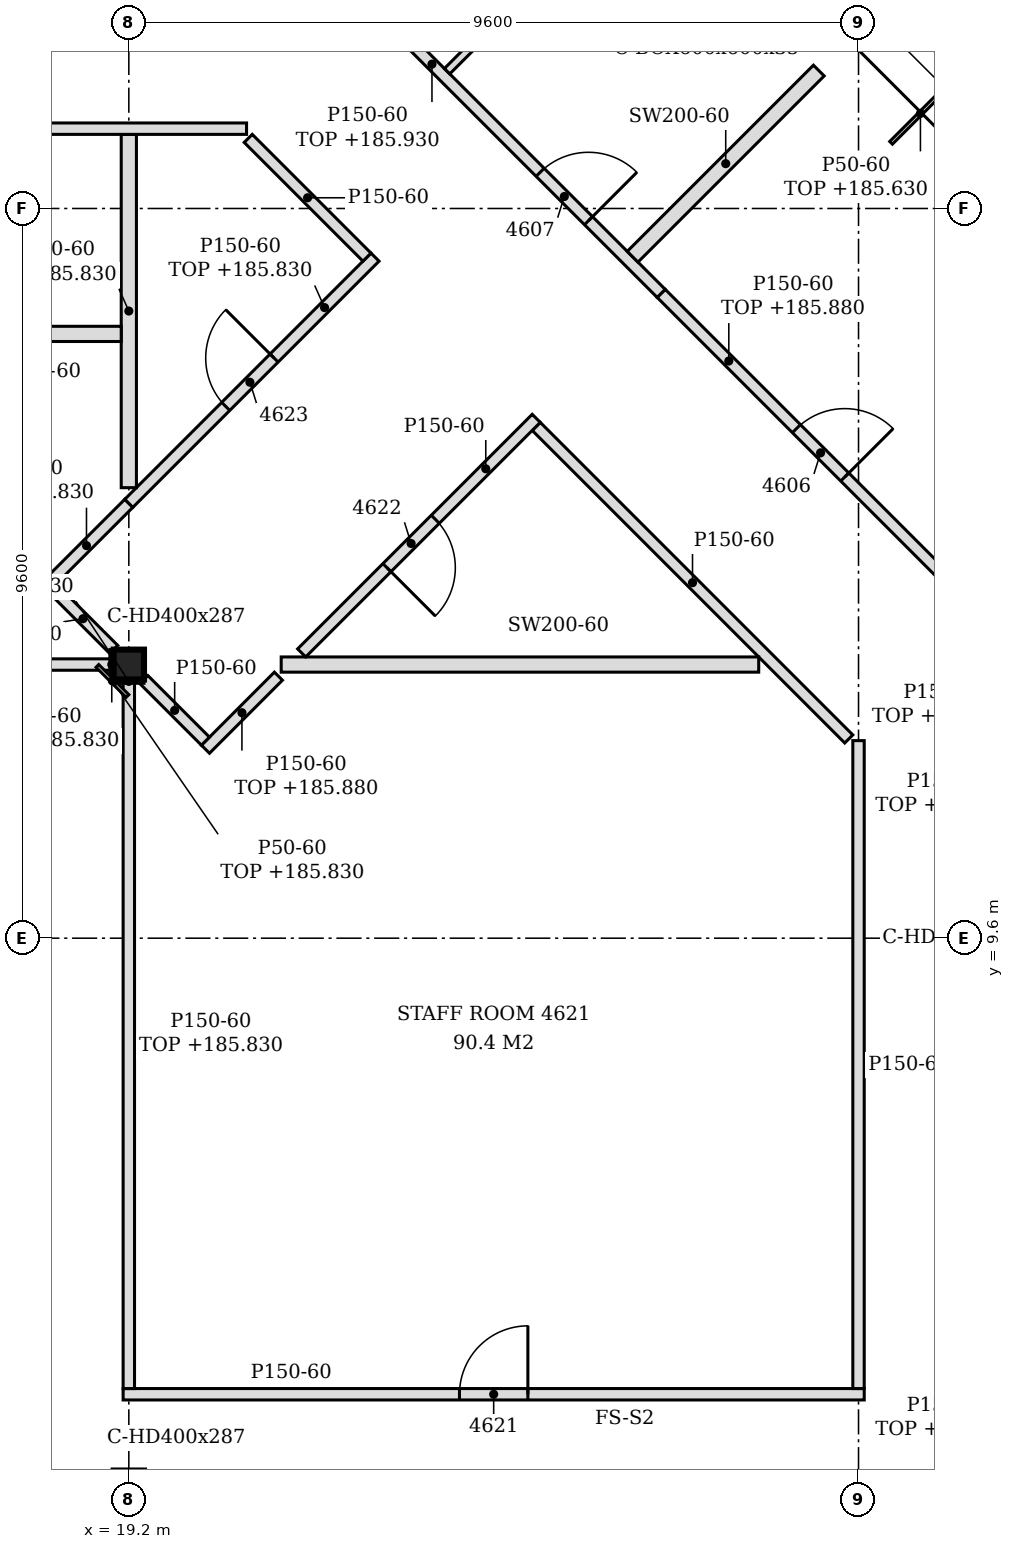
"""IFC4 building model, lengths in metres.
Left out: names, types, materials, properties, quantities, classifications, styles, units other than length and angle.
Written with IfcOpenShell. Run it as: python <this file> out.ifc"""

import sys

from ifc_helpers import new_model, si_unit, direction, frame, frame_2d, origin, origin_2d, place, context, subcontext, project, spatial, polyline, rectangle, hollow_rectangle, i_section, outline, extrude, clip, halfspace, element, fill, save


model = new_model("IFC4")
c1 = context("Model", 3, precision=1e-05, world=origin(), true_north=direction((0.0, 1.0)))
c2 = subcontext(c1, "Body", "Model", "MODEL_VIEW")
j1 = project(units=[si_unit("LENGTHUNIT", "METRE"), si_unit("PLANEANGLEUNIT", "RADIAN")], contexts=[c1])
p1 = place(None, origin())
s1 = spatial("IfcSite", under=j1, at=p1, CompositionType="ELEMENT")
p2 = place(p1, origin())
s2 = spatial("IfcBuilding", under=s1, at=p2, CompositionType="ELEMENT")
p3 = place(p2, frame((0.0, 0.0, 183.0)))
s3 = spatial("IfcBuildingStorey", under=s2, at=p3, CompositionType="ELEMENT", Elevation=183.0)
p4 = place(p3, frame((27.876, 21.926, -0.15), z_axis=(0.387233423141, -0.258175624389, 0.885096391911), x_axis=(0.554729959787, 0.832030451194, 0.0)))
e1 = element("IfcColumn", 1, at=p4, inside=s3, PredefinedType="COLUMN", context=c2, shape_type="Clipping", body=[
    clip(extrude(hollow_rectangle(XDim=0.6, YDim=0.6, WallThickness=0.035, at=origin_2d()), origin(), (0.0, 0.0, 1.0), 4.067), halfspace(frame((0.0, 0.0, 0.019), z_axis=(0.0, 0.0, 1.0), x_axis=(1.0, 0.0, 0.0)), True)),
])
p5 = place(p3, frame((19.2, 13.2, -0.15), z_axis=(0.0, 0.0, 1.0), x_axis=(1.0, 0.0, 0.0)))
e2 = element("IfcColumn", 2, at=p5, inside=s3, PredefinedType="COLUMN", context=c2, shape_type="SweptSolid", body=[
    extrude(i_section(OverallWidth=0.399, OverallDepth=0.393, WebThickness=0.023, FlangeThickness=0.037, FilletRadius=0.015, at=origin_2d()), origin(), (0.0, 0.0, 1.0), 3.6),
])
p6 = place(p3, frame((19.125, 3.6, 0.0), z_axis=(0.0, 0.0, 1.0), x_axis=(1.0, 0.0, 0.0)))
e3 = element("IfcWall", 3, at=p6, inside=s3, PredefinedType="PARTITIONING", context=c2, shape_type="SweptSolid", body=[
    extrude(outline(polyline([(0.0, 0.0), (9.75, 0.0), (9.75, 3.45), (0.225, 3.45), (0.223, 2.83), (0.0, 2.83), (0.0, 0.0)])), frame((0.0, 0.075, 0.0), z_axis=(0.0, -1.0, 0.0), x_axis=(1.0, 0.0, 0.0)), (0.0, 0.0, 1.0), 0.15),
])
p7 = place(p6, frame((4.425, 0.0, 0.0)))
e4 = element("IfcOpeningElement", 4, at=p7, cuts=e3, PredefinedType="OPENING", context=c2, shape_type="SweptSolid", body=[
    extrude(rectangle(XDim=0.9, YDim=2.1, at=frame_2d((0.45, 1.05))), frame((0.0, 0.085, 0.0), z_axis=(0.0, -1.0, 0.0), x_axis=(1.0, 0.0, 0.0)), (0.0, 0.0, 1.0), 0.17),
])
p8 = place(p3, frame((19.2, 3.675, 0.0), z_axis=(0.0, 0.0, 1.0), x_axis=(0.0, 1.0, 0.0)))
e5 = element("IfcWall", 5, at=p8, inside=s3, PredefinedType="PARTITIONING", context=c2, shape_type="SweptSolid", body=[
    extrude(rectangle(XDim=9.328, YDim=0.15, at=frame_2d((4.664, 0.0))), origin(), (0.0, 0.0, 1.0), 2.83),
])
p9 = place(p3, frame((28.8, 3.675, 0.0), z_axis=(0.0, 0.0, 1.0), x_axis=(0.0, 1.0, 0.0)))
e6 = element("IfcWall", 6, at=p9, inside=s3, PredefinedType="PARTITIONING", context=c2, shape_type="SweptSolid", body=[
    extrude(outline(polyline([(0.0, 0.0), (8.524, 0.0), (8.524, 3.45), (8.43, 3.45), (8.428, 2.88), (8.22, 2.88), (8.218, 3.45), (3.63, 3.45), (3.628, 2.88), (3.42, 2.88), (3.418, 3.45), (0.0, 3.45), (0.0, 0.0)])), frame((0.0, 0.075, 0.0), z_axis=(0.0, -1.0, 0.0), x_axis=(1.0, 0.0, 0.0)), (0.0, 0.0, 1.0), 0.15),
])
p10 = place(p3, frame((20.208, 12.086, 0.0), z_axis=(0.0, 0.0, 1.0), x_axis=(0.706747296365, 0.707466083343, 0.0)))
e7 = element("IfcWall", 7, at=p10, inside=s3, PredefinedType="PARTITIONING", context=c2, shape_type="SweptSolid", body=[
    extrude(rectangle(XDim=1.359, YDim=0.15, at=frame_2d((0.679, 0.0))), origin(), (0.0, 0.0, 1.0), 2.88),
])
p11 = place(p3, frame((20.208, 12.192, 0.0), z_axis=(0.0, 0.0, 1.0), x_axis=(-0.70721334539, 0.707000200921, 0.0)))
e8 = element("IfcWall", 8, at=p11, inside=s3, PredefinedType="PARTITIONING", context=c2, shape_type="SweptSolid", body=[
    extrude(rectangle(XDim=1.146, YDim=0.15, at=frame_2d((0.573, 0.0))), origin(), (0.0, 0.0, 1.0), 3.45),
])
p12 = place(p3, frame((28.672, 12.221, 0.0), z_axis=(0.0, 0.0, 1.0), x_axis=(-0.707106781187, 0.707106781187, 0.0)))
e9 = element("IfcWall", 9, at=p12, inside=s3, PredefinedType="PARTITIONING", context=c2, shape_type="SweptSolid", body=[
    extrude(rectangle(XDim=5.815, YDim=0.15, at=frame_2d((2.908, 0.0))), origin(), (0.0, 0.0, 1.0), 3.45),
])
p13 = place(p3, frame((7.399, 13.2, 0.0), z_axis=(0.0, 0.0, 1.0), x_axis=(1.0, 0.0, 0.0)))
e10 = element("IfcWall", 10, at=p13, inside=s3, PredefinedType="PARTITIONING", context=c2, shape_type="SweptSolid", body=[
    extrude(rectangle(XDim=11.601, YDim=0.15, at=frame_2d((5.801, 0.0))), origin(), (0.0, 0.0, 1.0), 2.83),
])
p14 = place(p13, frame((0.551, 0.0, 0.0)))
e11 = element("IfcOpeningElement", 11, at=p14, cuts=e10, PredefinedType="OPENING", context=c2, shape_type="SweptSolid", body=[
    extrude(rectangle(XDim=0.9, YDim=2.1, at=frame_2d((0.45, 1.05))), frame((0.0, 0.085, 0.0), z_axis=(0.0, -1.0, 0.0), x_axis=(1.0, 0.0, 0.0)), (0.0, 0.0, 1.0), 0.17),
])
p15 = place(p3, frame((21.205, 13.2, 0.0), z_axis=(0.0, 0.0, 1.0), x_axis=(1.0, 0.0, 0.0)))
e12 = element("IfcWall", 12, at=p15, inside=s3, PredefinedType="PARTITIONING", context=c2, shape_type="SweptSolid", body=[
    extrude(rectangle(XDim=6.282, YDim=0.2, at=frame_2d((3.141, 0.0))), origin(), (0.0, 0.0, 1.0), 3.45),
])
p16 = place(p3, frame((19.002, 13.398, 0.0), z_axis=(0.0, 0.0, 1.0), x_axis=(-0.707000200921, 0.70721334539, 0.0)))
e13 = element("IfcWall", 13, at=p16, inside=s3, PredefinedType="PARTITIONING", context=c2, shape_type="SweptSolid", body=[
    extrude(rectangle(XDim=1.146, YDim=0.15, at=frame_2d((0.573, 0.0))), origin(), (0.0, 0.0, 1.0), 3.45),
])
p17 = place(p3, frame((21.474, 13.353, 0.0), z_axis=(0.0, 0.0, 1.0), x_axis=(0.707078810744, 0.707134750523, 0.0)))
e14 = element("IfcWall", 14, at=p17, inside=s3, PredefinedType="PARTITIONING", context=c2, shape_type="SweptSolid", body=[
    extrude(rectangle(XDim=4.364, YDim=0.15, at=frame_2d((2.182, 0.0))), origin(), (0.0, 0.0, 1.0), 3.45),
])
p18 = place(p17, frame((1.586, 0.0, 0.0)))
e15 = element("IfcOpeningElement", 15, at=p18, cuts=e14, PredefinedType="OPENING", context=c2, shape_type="SweptSolid", body=[
    extrude(rectangle(XDim=0.9, YDim=2.1, at=frame_2d((0.45, 1.05))), frame((0.0, 0.085, 0.0), z_axis=(0.0, -1.0, 0.0), x_axis=(1.0, 0.0, 0.0)), (0.0, 0.0, 1.0), 0.17),
])
p19 = place(p3, frame((30.328, 13.958, 0.0), z_axis=(0.0, 0.0, 1.0), x_axis=(-0.707023070192, 0.707190482272, 0.0)))
e16 = element("IfcWall", 16, at=p19, inside=s3, PredefinedType="PARTITIONING", context=c2, shape_type="SweptSolid", body=[
    extrude(rectangle(XDim=5.833, YDim=0.15, at=frame_2d((2.917, 0.0))), origin(), (0.0, 0.0, 1.0), 2.88),
])
p20 = place(p19, frame((2.417, 0.0, 0.0)))
e17 = element("IfcOpeningElement", 17, at=p20, cuts=e16, PredefinedType="OPENING", context=c2, shape_type="SweptSolid", body=[
    extrude(rectangle(XDim=0.9, YDim=2.1, at=frame_2d((0.45, 1.05))), frame((0.0, 0.085, 0.0), z_axis=(0.0, -1.0, 0.0), x_axis=(1.0, 0.0, 0.0)), (0.0, 0.0, 1.0), 0.17),
])
p21 = place(p3, frame((18.086, 14.208, 0.0), z_axis=(0.0, 0.0, 1.0), x_axis=(0.707416779731, 0.706796646678, 0.0)))
e18 = element("IfcWall", 18, at=p21, inside=s3, PredefinedType="PARTITIONING", context=c2, shape_type="SweptSolid", body=[
    extrude(rectangle(XDim=1.575, YDim=0.15, at=frame_2d((0.787, 0.0))), origin(), (0.0, 0.0, 1.0), 2.83),
])
p22 = place(p3, frame((19.2, 15.321, 0.0), z_axis=(0.0, 0.0, 1.0), x_axis=(0.707106781187, 0.707106781187, 0.0)))
e19 = element("IfcWall", 19, at=p22, inside=s3, PredefinedType="PARTITIONING", context=c2, shape_type="SweptSolid", body=[
    extrude(rectangle(XDim=4.581, YDim=0.15, at=frame_2d((2.29, 0.0))), origin(), (0.0, 0.0, 1.0), 2.83),
])
p23 = place(p22, frame((1.803, 0.0, 0.0)))
e20 = element("IfcOpeningElement", 20, at=p23, cuts=e19, PredefinedType="OPENING", context=c2, shape_type="SweptSolid", body=[
    extrude(rectangle(XDim=0.9, YDim=2.1, at=frame_2d((0.45, 1.05))), frame((0.0, 0.085, 0.0), z_axis=(0.0, -1.0, 0.0), x_axis=(1.0, 0.0, 0.0)), (0.0, 0.0, 1.0), 0.17),
])
p24 = place(p3, frame((19.2, 15.527, 0.0), z_axis=(0.0, 0.0, 1.0), x_axis=(0.0, 1.0, 0.0)))
e21 = element("IfcWall", 21, at=p24, inside=s3, PredefinedType="PARTITIONING", context=c2, shape_type="SweptSolid", body=[
    extrude(rectangle(XDim=4.648, YDim=0.2, at=frame_2d((2.324, 0.0))), origin(), (0.0, 0.0, 1.0), 2.83),
])
p25 = place(p3, frame((15.7, 17.55, 0.0), z_axis=(0.0, 0.0, 1.0), x_axis=(1.0, 0.0, 0.0)))
e22 = element("IfcWall", 22, at=p25, inside=s3, PredefinedType="PARTITIONING", context=c2, shape_type="SweptSolid", body=[
    extrude(outline(polyline([(0.0, 0.0), (3.4, 0.0), (3.4, 2.83), (3.35, 2.83), (3.348, 3.45), (0.0, 3.45), (0.0, 0.0)])), frame((0.0, 0.1, 0.0), z_axis=(0.0, -1.0, 0.0), x_axis=(1.0, 0.0, 0.0)), (0.0, 0.0, 1.0), 0.2),
])
p26 = place(p3, frame((26.204, 18.083, 0.0), z_axis=(0.0, 0.0, 1.0), x_axis=(-0.707106781187, 0.707106781187, 0.0)))
e23 = element("IfcWall", 23, at=p26, inside=s3, PredefinedType="PARTITIONING", context=c2, shape_type="SweptSolid", body=[
    extrude(rectangle(XDim=6.278, YDim=0.15, at=frame_2d((3.139, 0.0))), origin(), (0.0, 0.0, 1.0), 2.93),
])
p27 = place(p26, frame((1.353, 0.0, 0.0)))
e24 = element("IfcOpeningElement", 24, at=p27, cuts=e23, PredefinedType="OPENING", context=c2, shape_type="SweptSolid", body=[
    extrude(rectangle(XDim=0.9, YDim=2.1, at=frame_2d((0.45, 1.05))), frame((0.0, 0.085, 0.0), z_axis=(0.0, -1.0, 0.0), x_axis=(1.0, 0.0, 0.0)), (0.0, 0.0, 1.0), 0.17),
])
p28 = place(p3, frame((22.333, 18.56, 0.0), z_axis=(0.0, 0.0, 1.0), x_axis=(-0.707106781187, 0.707106781187, 0.0)))
e25 = element("IfcWall", 25, at=p28, inside=s3, PredefinedType="PARTITIONING", context=c2, shape_type="SweptSolid", body=[
    extrude(rectangle(XDim=2.209, YDim=0.15, at=frame_2d((1.104, 0.0))), origin(), (0.0, 0.0, 1.0), 3.45),
])
p29 = place(p3, frame((25.828, 18.565, 0.0), z_axis=(0.0, 0.0, 1.0), x_axis=(0.707106781187, 0.707106781187, 0.0)))
e26 = element("IfcWall", 26, at=p29, inside=s3, PredefinedType="PARTITIONING", context=c2, shape_type="SweptSolid", body=[
    extrude(rectangle(XDim=3.464, YDim=0.2, at=frame_2d((1.732, 0.0))), origin(), (0.0, 0.0, 1.0), 3.45),
])
p30 = place(p3, frame((2.144, 20.25, 0.0), z_axis=(0.0, 0.0, 1.0), x_axis=(1.0, 0.0, 0.0)))
e27 = element("IfcWall", 27, at=p30, inside=s3, PredefinedType="PARTITIONING", context=c2, shape_type="SweptSolid", body=[
    extrude(outline(polyline([(0.0, 0.0), (18.605, 0.0), (18.605, 3.45), (17.206, 3.45), (17.204, 2.83), (16.906, 2.83), (16.904, 3.45), (5.206, 3.45), (5.204, 2.83), (4.906, 2.83), (4.904, 3.45), (0.0, 3.45), (0.0, 0.0)])), frame((0.0, 0.075, 0.0), z_axis=(0.0, -1.0, 0.0), x_axis=(1.0, 0.0, 0.0)), (0.0, 0.0, 1.0), 0.15),
])
p31 = place(p30, frame((14.856, 0.0, 0.0)))
e28 = element("IfcOpeningElement", 28, at=p31, cuts=e27, PredefinedType="OPENING", context=c2, shape_type="SweptSolid", body=[
    extrude(rectangle(XDim=0.8, YDim=2.1, at=frame_2d((0.4, 1.05))), frame((0.0, 0.085, 0.0), z_axis=(0.0, -1.0, 0.0), x_axis=(1.0, 0.0, 0.0)), (0.0, 0.0, 1.0), 0.17),
])
p32 = place(p30, frame((11.706, 0.0, 0.0)))
e29 = element("IfcOpeningElement", 29, at=p32, cuts=e27, PredefinedType="OPENING", context=c2, shape_type="SweptSolid", body=[
    extrude(rectangle(XDim=0.8, YDim=2.1, at=frame_2d((0.4, 1.05))), frame((0.0, 0.085, 0.0), z_axis=(0.0, -1.0, 0.0), x_axis=(1.0, 0.0, 0.0)), (0.0, 0.0, 1.0), 0.17),
])
p33 = place(p3, frame((23.387, 21.006, 0.0), z_axis=(0.0, 0.0, 1.0), x_axis=(0.707158179099, 0.707055379538, 0.0)))
e30 = element("IfcWall", 30, at=p33, inside=s3, PredefinedType="PARTITIONING", context=c2, shape_type="SweptSolid", body=[
    extrude(rectangle(XDim=2.375, YDim=0.1, at=frame_2d((1.188, 0.0))), origin(), (0.0, 0.0, 1.0), 2.93),
])
p34 = place(p3, frame((18.976, 13.003, 0.0), z_axis=(0.0, 0.0, 1.0), x_axis=(0.0, 1.0, 0.0)))
e31 = element("IfcWall", 31, at=p34, inside=s3, PredefinedType="PARTITIONING", context=c2, shape_type="SweptSolid", body=[
    extrude(rectangle(XDim=0.393, YDim=0.05, at=frame_2d((0.197, 0.0))), origin(), (0.0, 0.0, 1.0), 2.83),
])
p35 = place(p3, frame((19.182, 12.786, 0.0), z_axis=(0.0, 0.0, 1.0), x_axis=(-0.707106781187, 0.707106781187, 0.0)))
e32 = element("IfcWall", 32, at=p35, inside=s3, PredefinedType="PARTITIONING", context=c2, shape_type="SweptSolid", body=[
    extrude(rectangle(XDim=0.56, YDim=0.05, at=frame_2d((0.28, 0.0))), origin(), (0.0, 0.0, 1.0), 2.83),
])
p36 = place(p3, frame((19.0, 12.979, 0.0), z_axis=(0.0, 0.0, 1.0), x_axis=(1.0, 0.0, 0.0)))
e33 = element("IfcWall", 33, at=p36, inside=s3, PredefinedType="PARTITIONING", context=c2, shape_type="SweptSolid", body=[
    extrude(rectangle(XDim=0.399, YDim=0.05, at=frame_2d((0.199, 0.0))), origin(), (0.0, 0.0, 1.0), 2.83),
])
p37 = place(p3, frame((29.228, 20.064, 0.0), z_axis=(0.0, 0.0, 1.0), x_axis=(0.707106781187, 0.707106781187, 0.0)))
e34 = element("IfcWall", 34, at=p37, inside=s3, PredefinedType="PARTITIONING", context=c2, shape_type="SweptSolid", body=[
    extrude(rectangle(XDim=1.093, YDim=0.05, at=frame_2d((0.546, 0.0))), origin(), (0.0, 0.0, 1.0), 2.63),
])
p38 = place(p20, frame((0.9, 0.0, 0.0), z_axis=(0.0, 0.0, 1.0), x_axis=(-1.0, 0.0, 0.0)))
e35 = element("IfcDoor", 35, at=p38, inside=s3, OperationType="SINGLE_SWING_RIGHT", PredefinedType="DOOR", context=c2, shape_type="SweptSolid", body=[
    extrude(rectangle(XDim=0.9, YDim=2.1, at=frame_2d((0.45, 1.05))), frame((0.0, 0.025, 0.0), z_axis=(0.0, -1.0, 0.0), x_axis=(1.0, 0.0, 0.0)), (0.0, 0.0, 1.0), 0.05),
])
fill(e17, e35)
p39 = place(p27, frame((0.9, 0.0, 0.0), z_axis=(0.0, 0.0, 1.0), x_axis=(-1.0, 0.0, 0.0)))
e36 = element("IfcDoor", 36, at=p39, inside=s3, OperationType="SINGLE_SWING_RIGHT", PredefinedType="DOOR", context=c2, shape_type="SweptSolid", body=[
    extrude(rectangle(XDim=0.9, YDim=2.1, at=frame_2d((0.45, 1.05))), frame((0.0, 0.025, 0.0), z_axis=(0.0, -1.0, 0.0), x_axis=(1.0, 0.0, 0.0)), (0.0, 0.0, 1.0), 0.05),
])
fill(e24, e36)
p40 = place(p7, origin())
e37 = element("IfcDoor", 37, at=p40, inside=s3, OperationType="SINGLE_SWING_RIGHT", PredefinedType="DOOR", context=c2, shape_type="SweptSolid", body=[
    extrude(rectangle(XDim=0.9, YDim=2.1, at=frame_2d((0.45, 1.05))), frame((0.0, 0.025, 0.0), z_axis=(0.0, -1.0, 0.0), x_axis=(1.0, 0.0, 0.0)), (0.0, 0.0, 1.0), 0.05),
])
fill(e4, e37)
p41 = place(p18, frame((0.9, 0.0, 0.0), z_axis=(0.0, 0.0, 1.0), x_axis=(-1.0, 0.0, 0.0)))
e38 = element("IfcDoor", 38, at=p41, inside=s3, OperationType="SINGLE_SWING_RIGHT", PredefinedType="DOOR", context=c2, shape_type="SweptSolid", body=[
    extrude(rectangle(XDim=0.9, YDim=2.1, at=frame_2d((0.45, 1.05))), frame((0.0, 0.025, 0.0), z_axis=(0.0, -1.0, 0.0), x_axis=(1.0, 0.0, 0.0)), (0.0, 0.0, 1.0), 0.05),
])
fill(e15, e38)
p42 = place(p23, origin())
e39 = element("IfcDoor", 39, at=p42, inside=s3, OperationType="SINGLE_SWING_RIGHT", PredefinedType="DOOR", context=c2, shape_type="SweptSolid", body=[
    extrude(rectangle(XDim=0.9, YDim=2.1, at=frame_2d((0.45, 1.05))), frame((0.0, 0.025, 0.0), z_axis=(0.0, -1.0, 0.0), x_axis=(1.0, 0.0, 0.0)), (0.0, 0.0, 1.0), 0.05),
])
fill(e20, e39)
save(model, sys.argv[1])
